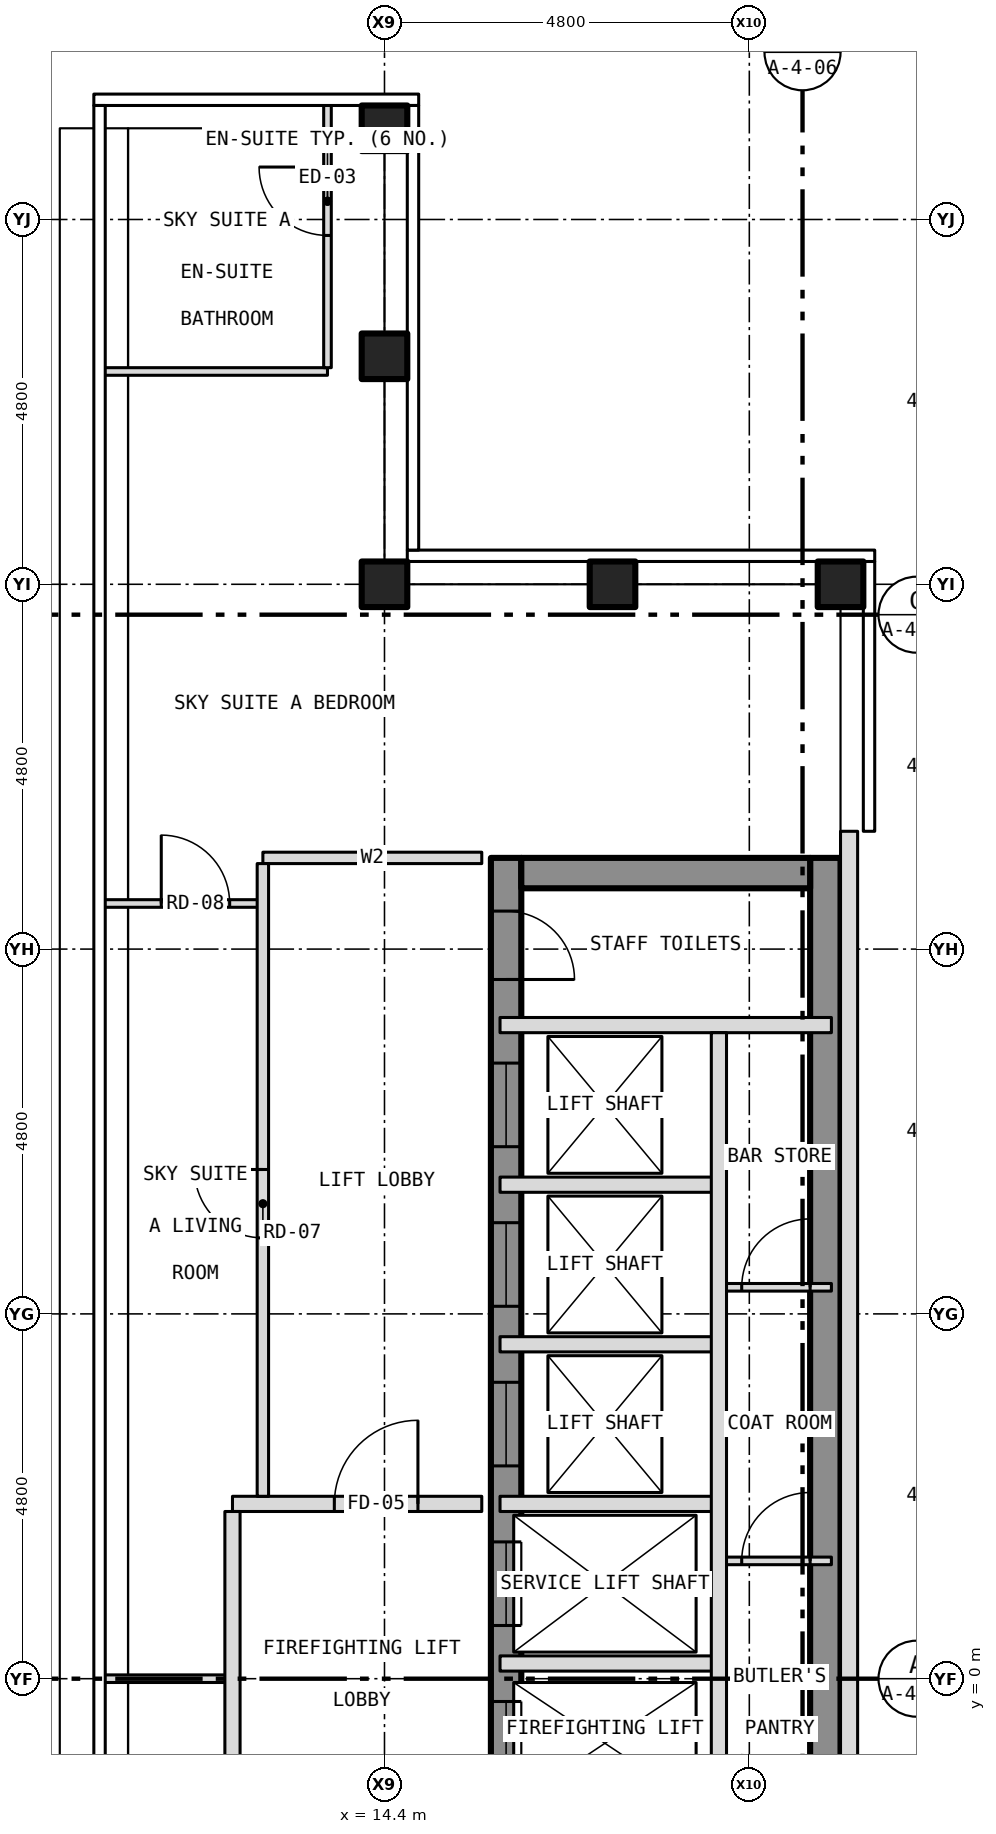
"""IFC4 building model, lengths in metres.
Left out: names, types, materials, properties, quantities, classifications, styles, units other than length and angle.
Written with IfcOpenShell. Run it as: python <this file> out.ifc"""

import sys

from ifc_helpers import new_model, si_unit, direction, frame, frame_2d, origin, origin_2d, place, context, subcontext, project, spatial, rectangle, hollow_rectangle, extrude, element, fill, save


model = new_model("IFC4")
c1 = context("Model", 3, precision=1e-05, world=origin(), true_north=direction((0.0, 1.0)))
c2 = subcontext(c1, "Body", "Model", "MODEL_VIEW")
j1 = project(units=[si_unit("LENGTHUNIT", "METRE"), si_unit("PLANEANGLEUNIT", "RADIAN")], contexts=[c1])
p1 = place(None, origin())
s1 = spatial("IfcSite", under=j1, at=p1, CompositionType="ELEMENT")
p2 = place(p1, origin())
s2 = spatial("IfcBuilding", under=s1, at=p2, CompositionType="ELEMENT")
p3 = place(p2, frame((0.0, 0.0, 283.0)))
s3 = spatial("IfcBuildingStorey", under=s2, at=p3, CompositionType="ELEMENT", Elevation=283.0)
for number, where, z_axis, x_axis in (
    (1, (14.4, 20.4, -0.15), (0.0, 0.0, 1.0), (1.0, 0.0, 0.0)),
    (2, (20.4, 14.4, -0.15), (0.0, 0.0, 1.0), (1.0, 0.0, 0.0)),
    (3, (14.4, 14.4, -0.15), (0.0, 0.0, 1.0), (1.0, 0.0, 0.0)),
    (4, (14.4, 17.4, -0.15), (0.0, 0.0, 1.0), (1.0, 0.0, 0.0)),
    (5, (17.4, 14.4, -0.15), (0.0, 0.0, 1.0), (1.0, 0.0, 0.0)),
):
    element("IfcColumn", number, at=place(p3, frame(where, z_axis=z_axis, x_axis=x_axis)), inside=s3, PredefinedType="COLUMN", context=c2, shape_type="SweptSolid", body=[
        extrude(hollow_rectangle(XDim=0.6, YDim=0.6, WallThickness=0.03, at=origin_2d()), origin(), (0.0, 0.0, 1.0), 3.5),
    ])
p4 = place(p3, frame((16.0, -10.8, 0.0), z_axis=(0.0, 0.0, 1.0), x_axis=(0.0, 1.0, 0.0)))
e6 = element("IfcWall", 6, at=p4, inside=s3, PredefinedType="SHEAR", context=c2, shape_type="SweptSolid", body=[
    extrude(rectangle(XDim=21.6, YDim=0.4, at=frame_2d((10.8, 0.0))), origin(), (0.0, 0.0, 1.0), 3.25),
])
p5 = place(p4, frame((9.4, 0.0, 0.0)))
e7 = element("IfcOpeningElement", 7, at=p5, cuts=e6, PredefinedType="OPENING", context=c2, shape_type="SweptSolid", body=[
    extrude(rectangle(XDim=1.1, YDim=2.1, at=frame_2d((0.55, 1.05))), frame((0.0, 0.212, 0.0), z_axis=(0.0, -1.0, 0.0), x_axis=(1.0, 0.0, 0.0)), (0.0, 0.0, 1.0), 0.424),
])
p6 = place(p4, frame((11.5, 0.0, 0.0)))
e8 = element("IfcOpeningElement", 8, at=p6, cuts=e6, PredefinedType="OPENING", context=c2, shape_type="SweptSolid", body=[
    extrude(rectangle(XDim=1.1, YDim=2.1, at=frame_2d((0.55, 1.05))), frame((0.0, 0.212, 0.0), z_axis=(0.0, -1.0, 0.0), x_axis=(1.0, 0.0, 0.0)), (0.0, 0.0, 1.0), 0.424),
])
p7 = place(p4, frame((13.6, 0.0, 0.0)))
e9 = element("IfcOpeningElement", 9, at=p7, cuts=e6, PredefinedType="OPENING", context=c2, shape_type="SweptSolid", body=[
    extrude(rectangle(XDim=1.1, YDim=2.1, at=frame_2d((0.55, 1.05))), frame((0.0, 0.212, 0.0), z_axis=(0.0, -1.0, 0.0), x_axis=(1.0, 0.0, 0.0)), (0.0, 0.0, 1.0), 0.424),
])
p8 = place(p4, frame((15.7, 0.0, 0.0)))
e10 = element("IfcOpeningElement", 10, at=p8, cuts=e6, PredefinedType="OPENING", context=c2, shape_type="SweptSolid", body=[
    extrude(rectangle(XDim=1.1, YDim=2.1, at=frame_2d((0.55, 1.05))), frame((0.0, 0.212, 0.0), z_axis=(0.0, -1.0, 0.0), x_axis=(1.0, 0.0, 0.0)), (0.0, 0.0, 1.0), 0.424),
])
p9 = place(p4, frame((17.8, 0.0, 0.0)))
e11 = element("IfcOpeningElement", 11, at=p9, cuts=e6, PredefinedType="OPENING", context=c2, shape_type="SweptSolid", body=[
    extrude(rectangle(XDim=1.1, YDim=2.1, at=frame_2d((0.55, 1.05))), frame((0.0, 0.212, 0.0), z_axis=(0.0, -1.0, 0.0), x_axis=(1.0, 0.0, 0.0)), (0.0, 0.0, 1.0), 0.424),
])
p10 = place(p4, frame((5.642, 0.0, 0.0)))
e12 = element("IfcOpeningElement", 12, at=p10, cuts=e6, PredefinedType="OPENING", context=c2, shape_type="SweptSolid", body=[
    extrude(rectangle(XDim=1.1, YDim=2.1, at=frame_2d((0.55, 1.05))), frame((0.0, 0.212, 0.0), z_axis=(0.0, -1.0, 0.0), x_axis=(1.0, 0.0, 0.0)), (0.0, 0.0, 1.0), 0.424),
])
p11 = place(p4, frame((7.5, 0.0, 0.0)))
e13 = element("IfcOpeningElement", 13, at=p11, cuts=e6, PredefinedType="OPENING", context=c2, shape_type="SweptSolid", body=[
    extrude(rectangle(XDim=1.1, YDim=2.1, at=frame_2d((0.55, 1.05))), frame((0.0, 0.212, 0.0), z_axis=(0.0, -1.0, 0.0), x_axis=(1.0, 0.0, 0.0)), (0.0, 0.0, 1.0), 0.424),
])
p12 = place(p4, frame((20.0, 0.0, 0.0)))
e14 = element("IfcOpeningElement", 14, at=p12, cuts=e6, PredefinedType="OPENING", context=c2, shape_type="SweptSolid", body=[
    extrude(rectangle(XDim=0.9, YDim=2.1, at=frame_2d((0.45, 1.05))), frame((0.0, 0.212, 0.0), z_axis=(0.0, -1.0, 0.0), x_axis=(1.0, 0.0, 0.0)), (0.0, 0.0, 1.0), 0.424),
])
p13 = place(p3, frame((20.2, -10.8, 0.0), z_axis=(0.0, 0.0, 1.0), x_axis=(0.0, 1.0, 0.0)))
e15 = element("IfcWall", 15, at=p13, inside=s3, PredefinedType="SHEAR", context=c2, shape_type="SweptSolid", body=[
    extrude(rectangle(XDim=21.6, YDim=0.4, at=frame_2d((10.8, 0.0))), origin(), (0.0, 0.0, 1.0), 3.25),
])
p14 = place(p3, frame((16.2, 10.6, 0.0), z_axis=(0.0, 0.0, 1.0), x_axis=(1.0, 0.0, 0.0)))
e16 = element("IfcWall", 16, at=p14, inside=s3, PredefinedType="SHEAR", context=c2, shape_type="SweptSolid", body=[
    extrude(rectangle(XDim=3.8, YDim=0.4, at=frame_2d((1.9, 0.0))), origin(), (0.0, 0.0, 1.0), 3.25),
])
p15 = place(p3, frame((20.512, -11.15, 0.0), z_axis=(0.0, 0.0, 1.0), x_axis=(0.0, 1.0, 0.0)))
e17 = element("IfcWall", 17, at=p15, inside=s3, PredefinedType="SOLIDWALL", context=c2, shape_type="SweptSolid", body=[
    extrude(rectangle(XDim=22.3, YDim=0.225, at=frame_2d((11.15, 0.0))), origin(), (0.0, 0.0, 1.0), 3.5),
])
p16 = place(p15, frame((3.3, 0.0, 1.0)))
e18 = element("IfcOpeningElement", 18, at=p16, cuts=e17, PredefinedType="OPENING", context=c2, shape_type="SweptSolid", body=[
    extrude(rectangle(XDim=0.6, YDim=1.5, at=frame_2d((0.3, 0.75))), frame((0.0, 0.125, 0.0), z_axis=(0.0, -1.0, 0.0), x_axis=(1.0, 0.0, 0.0)), (0.0, 0.0, 1.0), 0.249),
])
p17 = place(p3, frame((10.696, 0.0, 0.0), z_axis=(0.0, 0.0, 1.0), x_axis=(1.0, 0.0, 0.0)))
e19 = element("IfcWall", 19, at=p17, inside=s3, PredefinedType="PARTITIONING", context=c2, shape_type="SweptSolid", body=[
    extrude(rectangle(XDim=1.704, YDim=0.1, at=frame_2d((0.852, 0.0))), origin(), (0.0, 0.0, 1.0), 2.728),
])
p18 = place(p3, frame((15.92, 0.2, 0.0), z_axis=(0.0, 0.0, 1.0), x_axis=(1.0, 0.0, 0.0)))
e20 = element("IfcWall", 20, at=p18, inside=s3, PredefinedType="PARTITIONING", context=c2, shape_type="SweptSolid", body=[
    extrude(rectangle(XDim=2.88, YDim=0.2, at=frame_2d((1.44, 0.0))), origin(), (0.0, 0.0, 1.0), 3.25),
])
p19 = place(p3, frame((18.8, 1.55, 0.0), z_axis=(0.0, 0.0, 1.0), x_axis=(1.0, 0.0, 0.0)))
e21 = element("IfcWall", 21, at=p19, inside=s3, PredefinedType="PARTITIONING", context=c2, shape_type="SweptSolid", body=[
    extrude(rectangle(XDim=1.48, YDim=0.1, at=frame_2d((0.74, 0.0))), origin(), (0.0, 0.0, 1.0), 3.25),
])
p20 = place(p19, frame((0.3, 0.0, 0.0)))
e22 = element("IfcOpeningElement", 22, at=p20, cuts=e21, PredefinedType="OPENING", context=c2, shape_type="SweptSolid", body=[
    extrude(rectangle(XDim=0.9, YDim=2.1, at=frame_2d((0.45, 1.05))), frame((0.0, 0.062, 0.0), z_axis=(0.0, -1.0, 0.0), x_axis=(1.0, 0.0, 0.0)), (0.0, 0.0, 1.0), 0.124),
])
p21 = place(p3, frame((12.4, 2.3, 0.0), z_axis=(0.0, 0.0, 1.0), x_axis=(1.0, 0.0, 0.0)))
e23 = element("IfcWall", 23, at=p21, inside=s3, PredefinedType="PARTITIONING", context=c2, shape_type="SweptSolid", body=[
    extrude(rectangle(XDim=3.28, YDim=0.2, at=frame_2d((1.64, 0.0))), origin(), (0.0, 0.0, 1.0), 3.35),
])
p22 = place(p21, frame((1.34, 0.0, 0.0)))
e24 = element("IfcOpeningElement", 24, at=p22, cuts=e23, PredefinedType="OPENING", context=c2, shape_type="SweptSolid", body=[
    extrude(rectangle(XDim=1.1, YDim=2.1, at=frame_2d((0.55, 1.05))), frame((0.0, 0.112, 0.0), z_axis=(0.0, -1.0, 0.0), x_axis=(1.0, 0.0, 0.0)), (0.0, 0.0, 1.0), 0.224),
])
for number, where, z_axis, x_axis in (
    (25, (15.92, 2.3, 0.0), (0.0, 0.0, 1.0), (1.0, 0.0, 0.0)),
    (26, (15.92, 4.4, 0.0), (0.0, 0.0, 1.0), (1.0, 0.0, 0.0)),
):
    element("IfcWall", number, at=place(p3, frame(where, z_axis=z_axis, x_axis=x_axis)), inside=s3, PredefinedType="PARTITIONING", context=c2, shape_type="SweptSolid", body=[
        extrude(rectangle(XDim=2.88, YDim=0.2, at=frame_2d((1.44, 0.0))), origin(), (0.0, 0.0, 1.0), 3.25),
    ])
p23 = place(p3, frame((18.8, 5.15, 0.0), z_axis=(0.0, 0.0, 1.0), x_axis=(1.0, 0.0, 0.0)))
e27 = element("IfcWall", 27, at=p23, inside=s3, PredefinedType="PARTITIONING", context=c2, shape_type="SweptSolid", body=[
    extrude(rectangle(XDim=1.48, YDim=0.1, at=frame_2d((0.74, 0.0))), origin(), (0.0, 0.0, 1.0), 3.25),
])
p24 = place(p23, frame((0.3, 0.0, 0.0)))
e28 = element("IfcOpeningElement", 28, at=p24, cuts=e27, PredefinedType="OPENING", context=c2, shape_type="SweptSolid", body=[
    extrude(rectangle(XDim=0.9, YDim=2.1, at=frame_2d((0.45, 1.05))), frame((0.0, 0.062, 0.0), z_axis=(0.0, -1.0, 0.0), x_axis=(1.0, 0.0, 0.0)), (0.0, 0.0, 1.0), 0.124),
])
p25 = place(p3, frame((15.92, 6.5, 0.0), z_axis=(0.0, 0.0, 1.0), x_axis=(1.0, 0.0, 0.0)))
e29 = element("IfcWall", 29, at=p25, inside=s3, PredefinedType="PARTITIONING", context=c2, shape_type="SweptSolid", body=[
    extrude(rectangle(XDim=2.88, YDim=0.2, at=frame_2d((1.44, 0.0))), origin(), (0.0, 0.0, 1.0), 3.25),
])
p26 = place(p3, frame((15.92, 8.6, 0.0), z_axis=(0.0, 0.0, 1.0), x_axis=(1.0, 0.0, 0.0)))
e30 = element("IfcWall", 30, at=p26, inside=s3, PredefinedType="PARTITIONING", context=c2, shape_type="SweptSolid", body=[
    extrude(rectangle(XDim=4.36, YDim=0.2, at=frame_2d((2.18, 0.0))), origin(), (0.0, 0.0, 1.0), 3.25),
])
p27 = place(p3, frame((10.696, 10.2, 0.0), z_axis=(0.0, 0.0, 1.0), x_axis=(1.0, 0.0, 0.0)))
e31 = element("IfcWall", 31, at=p27, inside=s3, PredefinedType="PARTITIONING", context=c2, shape_type="SweptSolid", body=[
    extrude(rectangle(XDim=2.104, YDim=0.1, at=frame_2d((1.052, 0.0))), origin(), (0.0, 0.0, 1.0), 3.35),
])
p28 = place(p27, frame((0.767, 0.0, 0.0)))
e32 = element("IfcOpeningElement", 32, at=p28, cuts=e31, PredefinedType="OPENING", context=c2, shape_type="SweptSolid", body=[
    extrude(rectangle(XDim=0.9, YDim=2.1, at=frame_2d((0.45, 1.05))), frame((0.0, 0.062, 0.0), z_axis=(0.0, -1.0, 0.0), x_axis=(1.0, 0.0, 0.0)), (0.0, 0.0, 1.0), 0.124),
])
p29 = place(p3, frame((12.8, 10.8, 0.0), z_axis=(0.0, 0.0, 1.0), x_axis=(1.0, 0.0, 0.0)))
e33 = element("IfcWall", 33, at=p29, inside=s3, PredefinedType="PARTITIONING", context=c2, shape_type="SweptSolid", body=[
    extrude(rectangle(XDim=2.88, YDim=0.15, at=frame_2d((1.44, 0.0))), origin(), (0.0, 0.0, 1.0), 3.35),
])
p30 = place(p3, frame((10.696, 17.2, 0.0), z_axis=(0.0, 0.0, 1.0), x_axis=(1.0, 0.0, 0.0)))
e34 = element("IfcWall", 34, at=p30, inside=s3, PredefinedType="PARTITIONING", context=c2, shape_type="SweptSolid", body=[
    extrude(rectangle(XDim=2.954, YDim=0.1, at=frame_2d((1.477, 0.0))), origin(), (0.0, 0.0, 1.0), 3.35),
])
p31 = place(p3, frame((12.4, -1.8, 0.0), z_axis=(0.0, 0.0, 1.0), x_axis=(0.0, 1.0, 0.0)))
e35 = element("IfcWall", 35, at=p31, inside=s3, PredefinedType="PARTITIONING", context=c2, shape_type="SweptSolid", body=[
    extrude(rectangle(XDim=4.0, YDim=0.2, at=frame_2d((2.0, 0.0))), origin(), (0.0, 0.0, 1.0), 3.35),
])
p32 = place(p3, frame((12.8, 2.4, 0.0), z_axis=(0.0, 0.0, 1.0), x_axis=(0.0, 1.0, 0.0)))
e36 = element("IfcWall", 36, at=p32, inside=s3, PredefinedType="PARTITIONING", context=c2, shape_type="SweptSolid", body=[
    extrude(rectangle(XDim=8.325, YDim=0.15, at=frame_2d((4.163, 0.0))), origin(), (0.0, 0.0, 1.0), 3.35),
])
p33 = place(p32, frame((3.4, 0.0, 0.0)))
e37 = element("IfcOpeningElement", 37, at=p33, cuts=e36, PredefinedType="OPENING", context=c2, shape_type="SweptSolid", body=[
    extrude(rectangle(XDim=0.9, YDim=2.1, at=frame_2d((0.45, 1.05))), frame((0.0, 0.087, 0.0), z_axis=(0.0, -1.0, 0.0), x_axis=(1.0, 0.0, 0.0)), (0.0, 0.0, 1.0), 0.174),
])
p34 = place(p3, frame((13.65, 17.25, 0.0), z_axis=(0.0, 0.0, 1.0), x_axis=(0.0, 1.0, 0.0)))
e38 = element("IfcWall", 38, at=p34, inside=s3, PredefinedType="PARTITIONING", context=c2, shape_type="SweptSolid", body=[
    extrude(rectangle(XDim=3.48, YDim=0.1, at=frame_2d((1.74, 0.0))), origin(), (0.0, 0.0, 1.0), 3.35),
])
p35 = place(p34, frame((1.74, 0.0, 0.0)))
e39 = element("IfcOpeningElement", 39, at=p35, cuts=e38, PredefinedType="OPENING", context=c2, shape_type="SweptSolid", body=[
    extrude(rectangle(XDim=0.9, YDim=2.1, at=frame_2d((0.45, 1.05))), frame((0.0, 0.062, 0.0), z_axis=(0.0, -1.0, 0.0), x_axis=(1.0, 0.0, 0.0)), (0.0, 0.0, 1.0), 0.124),
])
p36 = place(p3, frame((18.8, -1.8, 0.0), z_axis=(0.0, 0.0, 1.0), x_axis=(0.0, 1.0, 0.0)))
e40 = element("IfcWall", 40, at=p36, inside=s3, PredefinedType="PARTITIONING", context=c2, shape_type="SweptSolid", body=[
    extrude(rectangle(XDim=10.3, YDim=0.2, at=frame_2d((5.15, 0.0))), origin(), (0.0, 0.0, 1.0), 3.25),
])
p37 = place(p5, origin())
e41 = element("IfcDoor", 41, at=p37, inside=s3, OperationType="SLIDING_TO_LEFT", PredefinedType="DOOR", context=c2, shape_type="SweptSolid", body=[
    extrude(rectangle(XDim=1.1, YDim=2.1, at=frame_2d((0.55, 1.05))), frame((0.0, 0.025, 0.0), z_axis=(0.0, -1.0, 0.0), x_axis=(1.0, 0.0, 0.0)), (0.0, 0.0, 1.0), 0.05),
])
fill(e7, e41)
p38 = place(p6, origin())
e42 = element("IfcDoor", 42, at=p38, inside=s3, OperationType="SLIDING_TO_LEFT", PredefinedType="DOOR", context=c2, shape_type="SweptSolid", body=[
    extrude(rectangle(XDim=1.1, YDim=2.1, at=frame_2d((0.55, 1.05))), frame((0.0, 0.025, 0.0), z_axis=(0.0, -1.0, 0.0), x_axis=(1.0, 0.0, 0.0)), (0.0, 0.0, 1.0), 0.05),
])
fill(e8, e42)
p39 = place(p7, origin())
e43 = element("IfcDoor", 43, at=p39, inside=s3, OperationType="SLIDING_TO_LEFT", PredefinedType="DOOR", context=c2, shape_type="SweptSolid", body=[
    extrude(rectangle(XDim=1.1, YDim=2.1, at=frame_2d((0.55, 1.05))), frame((0.0, 0.025, 0.0), z_axis=(0.0, -1.0, 0.0), x_axis=(1.0, 0.0, 0.0)), (0.0, 0.0, 1.0), 0.05),
])
fill(e9, e43)
p40 = place(p8, origin())
e44 = element("IfcDoor", 44, at=p40, inside=s3, OperationType="SLIDING_TO_LEFT", PredefinedType="DOOR", context=c2, shape_type="SweptSolid", body=[
    extrude(rectangle(XDim=1.1, YDim=2.1, at=frame_2d((0.55, 1.05))), frame((0.0, 0.025, 0.0), z_axis=(0.0, -1.0, 0.0), x_axis=(1.0, 0.0, 0.0)), (0.0, 0.0, 1.0), 0.05),
])
fill(e10, e44)
p41 = place(p9, origin())
e45 = element("IfcDoor", 45, at=p41, inside=s3, OperationType="SLIDING_TO_LEFT", PredefinedType="DOOR", context=c2, shape_type="SweptSolid", body=[
    extrude(rectangle(XDim=1.1, YDim=2.1, at=frame_2d((0.55, 1.05))), frame((0.0, 0.025, 0.0), z_axis=(0.0, -1.0, 0.0), x_axis=(1.0, 0.0, 0.0)), (0.0, 0.0, 1.0), 0.05),
])
fill(e11, e45)
p42 = place(p12, origin())
e46 = element("IfcDoor", 46, at=p42, inside=s3, OperationType="SINGLE_SWING_LEFT", PredefinedType="DOOR", context=c2, shape_type="SweptSolid", body=[
    extrude(rectangle(XDim=0.9, YDim=2.1, at=frame_2d((0.45, 1.05))), frame((0.0, 0.025, 0.0), z_axis=(0.0, -1.0, 0.0), x_axis=(1.0, 0.0, 0.0)), (0.0, 0.0, 1.0), 0.05),
])
fill(e14, e46)
p43 = place(p20, origin())
e47 = element("IfcDoor", 47, at=p43, inside=s3, OperationType="SINGLE_SWING_RIGHT", PredefinedType="DOOR", context=c2, shape_type="SweptSolid", body=[
    extrude(rectangle(XDim=0.9, YDim=2.1, at=frame_2d((0.45, 1.05))), frame((0.0, 0.025, 0.0), z_axis=(0.0, -1.0, 0.0), x_axis=(1.0, 0.0, 0.0)), (0.0, 0.0, 1.0), 0.05),
])
fill(e22, e47)
p44 = place(p24, origin())
e48 = element("IfcDoor", 48, at=p44, inside=s3, OperationType="SINGLE_SWING_RIGHT", PredefinedType="DOOR", context=c2, shape_type="SweptSolid", body=[
    extrude(rectangle(XDim=0.9, YDim=2.1, at=frame_2d((0.45, 1.05))), frame((0.0, 0.025, 0.0), z_axis=(0.0, -1.0, 0.0), x_axis=(1.0, 0.0, 0.0)), (0.0, 0.0, 1.0), 0.05),
])
fill(e28, e48)
p45 = place(p22, origin())
e49 = element("IfcDoor", 49, at=p45, inside=s3, OperationType="SINGLE_SWING_RIGHT", PredefinedType="DOOR", context=c2, shape_type="SweptSolid", body=[
    extrude(rectangle(XDim=1.1, YDim=2.1, at=frame_2d((0.55, 1.05))), frame((0.0, 0.025, 0.0), z_axis=(0.0, -1.0, 0.0), x_axis=(1.0, 0.0, 0.0)), (0.0, 0.0, 1.0), 0.05),
])
fill(e24, e49)
p46 = place(p33, origin())
e50 = element("IfcDoor", 50, at=p46, inside=s3, OperationType="SINGLE_SWING_RIGHT", PredefinedType="DOOR", context=c2, shape_type="SweptSolid", body=[
    extrude(rectangle(XDim=0.9, YDim=2.1, at=frame_2d((0.45, 1.05))), frame((0.0, 0.025, 0.0), z_axis=(0.0, -1.0, 0.0), x_axis=(1.0, 0.0, 0.0)), (0.0, 0.0, 1.0), 0.05),
])
fill(e37, e50)
p47 = place(p28, origin())
e51 = element("IfcDoor", 51, at=p47, inside=s3, OperationType="SINGLE_SWING_LEFT", PredefinedType="DOOR", context=c2, shape_type="SweptSolid", body=[
    extrude(rectangle(XDim=0.9, YDim=2.1, at=frame_2d((0.45, 1.05))), frame((0.0, 0.025, 0.0), z_axis=(0.0, -1.0, 0.0), x_axis=(1.0, 0.0, 0.0)), (0.0, 0.0, 1.0), 0.05),
])
fill(e32, e51)
p48 = place(p35, origin())
e52 = element("IfcDoor", 52, at=p48, inside=s3, OperationType="SINGLE_SWING_RIGHT", PredefinedType="DOOR", context=c2, shape_type="SweptSolid", body=[
    extrude(rectangle(XDim=0.9, YDim=2.1, at=frame_2d((0.45, 1.05))), frame((0.0, 0.025, 0.0), z_axis=(0.0, -1.0, 0.0), x_axis=(1.0, 0.0, 0.0)), (0.0, 0.0, 1.0), 0.05),
])
fill(e39, e52)
save(model, sys.argv[1])
